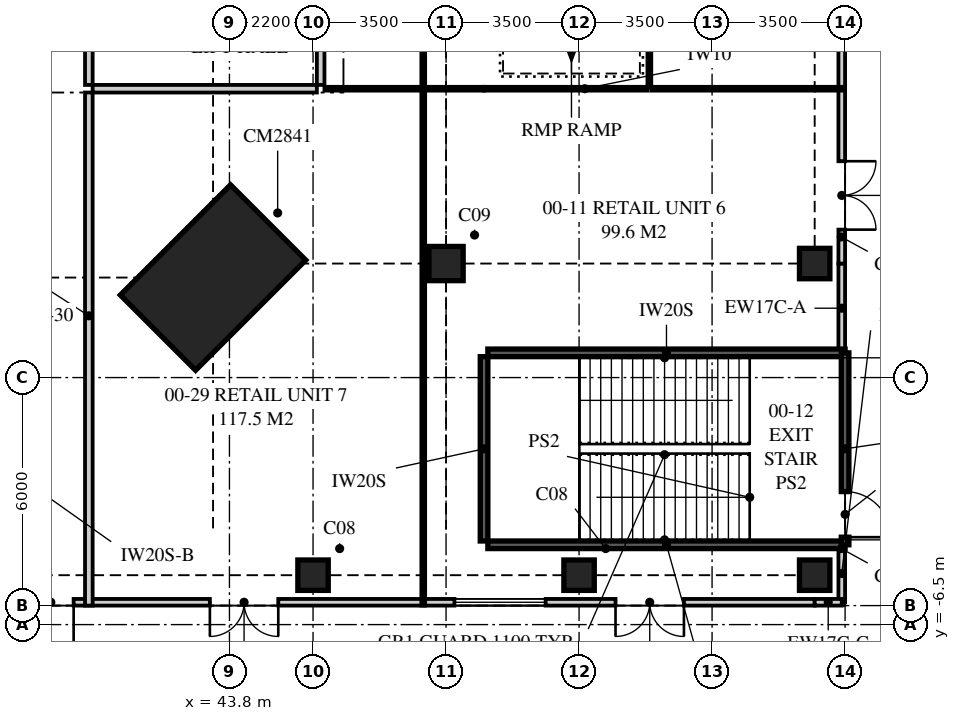
"""IFC4 building model, lengths in metres.
Left out: names, types, materials, properties, quantities, classifications, styles, units other than length and angle.
Written with IfcOpenShell. Run it as: python <this file> out.ifc"""

import sys

from ifc_helpers import new_model, si_unit, direction, frame, frame_2d, origin, origin_2d, place, context, subcontext, project, spatial, polyline, rectangle, outline, extrude, element, fill, save


model = new_model("IFC4")
c1 = context("Model", 3, precision=1e-05, world=origin(), true_north=direction((0.0, 1.0)))
c2 = subcontext(c1, "Body", "Model", "MODEL_VIEW")
j1 = project(units=[si_unit("LENGTHUNIT", "METRE"), si_unit("PLANEANGLEUNIT", "RADIAN")], contexts=[c1])
p1 = place(None, origin())
s1 = spatial("IfcSite", under=j1, at=p1, CompositionType="ELEMENT")
p2 = place(p1, origin())
s2 = spatial("IfcBuilding", under=s1, at=p2, CompositionType="ELEMENT")
p3 = place(p2, origin())
s3 = spatial("IfcBuildingStorey", under=s2, at=p3, CompositionType="ELEMENT", Elevation=0.0)
p4 = place(p3, frame((43.369, 2.631, 0.0), z_axis=(0.0, 0.0, 1.0), x_axis=(-0.707106781187, 0.707106781187, 0.0)))
e1 = element("IfcColumn", 1, at=p4, inside=s3, PredefinedType="COLUMN", context=c2, shape_type="SweptSolid", body=[
    extrude(rectangle(XDim=2.8, YDim=4.1, at=origin_2d()), origin(), (0.0, 0.0, 1.0), 6.0),
])
for number, where, z_axis, x_axis in (
    (2, (46.0, -5.2, 0.0), (0.0, 0.0, 1.0), (1.0, 0.0, 0.0)),
    (3, (53.0, -5.2, 0.0), (0.0, 0.0, 1.0), (1.0, 0.0, 0.0)),
    (4, (59.2, -5.2, 0.0), (0.0, 0.0, 1.0), (1.0, 0.0, 0.0)),
):
    element("IfcColumn", number, at=place(p3, frame(where, z_axis=z_axis, x_axis=x_axis)), inside=s3, PredefinedType="COLUMN", context=c2, shape_type="SweptSolid", body=[
        extrude(rectangle(XDim=0.8, YDim=0.8, at=origin_2d()), origin(), (0.0, 0.0, 1.0), 6.0),
    ])
p5 = place(p3, frame((49.5, 3.0, 0.0), z_axis=(0.0, 0.0, 1.0), x_axis=(1.0, 0.0, 0.0)))
e5 = element("IfcColumn", 5, at=p5, inside=s3, PredefinedType="COLUMN", context=c2, shape_type="SweptSolid", body=[
    extrude(rectangle(XDim=0.9, YDim=0.9, at=origin_2d()), origin(), (0.0, 0.0, 1.0), 6.0),
])
p6 = place(p3, frame((59.2, 3.0, 0.0), z_axis=(0.0, 0.0, 1.0), x_axis=(1.0, 0.0, 0.0)))
e6 = element("IfcColumn", 6, at=p6, inside=s3, PredefinedType="COLUMN", context=c2, shape_type="SweptSolid", body=[
    extrude(rectangle(XDim=0.8, YDim=0.8, at=origin_2d()), origin(), (0.0, 0.0, 1.0), 6.0),
])
p7 = place(p3, frame((-9.2, -5.913, 0.0), z_axis=(0.0, 0.0, 1.0), x_axis=(1.0, 0.0, 0.0)))
e7 = element("IfcWall", 7, at=p7, inside=s3, PredefinedType="SOLIDWALL", context=c2, shape_type="SweptSolid", body=[
    extrude(rectangle(XDim=68.4, YDim=0.175, at=frame_2d((34.2, 0.0))), origin(), (0.0, 0.0, 1.0), 5.12),
])
p8 = place(p7, frame((4.819, 0.0, 0.0)))
e8 = element("IfcOpeningElement", 8, at=p8, cuts=e7, PredefinedType="OPENING", context=c2, shape_type="SweptSolid", body=[
    extrude(rectangle(XDim=1.8, YDim=2.7, at=frame_2d((0.9, 1.35))), frame((0.0, 0.097, 0.0), z_axis=(0.0, -1.0, 0.0), x_axis=(1.0, 0.0, 0.0)), (0.0, 0.0, 1.0), 0.195),
])
p9 = place(p7, frame((0.871, 0.0, 0.3)))
e9 = element("IfcOpeningElement", 9, at=p9, cuts=e7, PredefinedType="OPENING", context=c2, shape_type="SweptSolid", body=[
    extrude(rectangle(XDim=2.4, YDim=3.0, at=frame_2d((1.2, 1.5))), frame((0.0, 0.097, 0.0), z_axis=(0.0, -1.0, 0.0), x_axis=(1.0, 0.0, 0.0)), (0.0, 0.0, 1.0), 0.195),
])
p10 = place(p7, frame((8.334, 0.0, 0.3)))
e10 = element("IfcOpeningElement", 10, at=p10, cuts=e7, PredefinedType="OPENING", context=c2, shape_type="SweptSolid", body=[
    extrude(rectangle(XDim=2.4, YDim=3.0, at=frame_2d((1.2, 1.5))), frame((0.0, 0.097, 0.0), z_axis=(0.0, -1.0, 0.0), x_axis=(1.0, 0.0, 0.0)), (0.0, 0.0, 1.0), 0.195),
])
p11 = place(p7, frame((14.45, 0.0, 0.0)))
e11 = element("IfcOpeningElement", 11, at=p11, cuts=e7, PredefinedType="OPENING", context=c2, shape_type="SweptSolid", body=[
    extrude(rectangle(XDim=2.0, YDim=2.7, at=frame_2d((1.0, 1.35))), frame((0.0, 0.097, 0.0), z_axis=(0.0, -1.0, 0.0), x_axis=(1.0, 0.0, 0.0)), (0.0, 0.0, 1.0), 0.195),
])
p12 = place(p7, frame((22.17, 0.0, 0.0)))
e12 = element("IfcOpeningElement", 12, at=p12, cuts=e7, PredefinedType="OPENING", context=c2, shape_type="SweptSolid", body=[
    extrude(rectangle(XDim=1.8, YDim=2.7, at=frame_2d((0.9, 1.35))), frame((0.0, 0.097, 0.0), z_axis=(0.0, -1.0, 0.0), x_axis=(1.0, 0.0, 0.0)), (0.0, 0.0, 1.0), 0.195),
])
p13 = place(p7, frame((26.75, 0.0, 0.0)))
e13 = element("IfcOpeningElement", 13, at=p13, cuts=e7, PredefinedType="OPENING", context=c2, shape_type="SweptSolid", body=[
    extrude(rectangle(XDim=1.2, YDim=2.1, at=frame_2d((0.6, 1.05))), frame((0.0, 0.097, 0.0), z_axis=(0.0, -1.0, 0.0), x_axis=(1.0, 0.0, 0.0)), (0.0, 0.0, 1.0), 0.195),
])
p14 = place(p7, frame((31.55, 0.0, 0.0)))
e14 = element("IfcOpeningElement", 14, at=p14, cuts=e7, PredefinedType="OPENING", context=c2, shape_type="SweptSolid", body=[
    extrude(rectangle(XDim=1.8, YDim=2.7, at=frame_2d((0.9, 1.35))), frame((0.0, 0.097, 0.0), z_axis=(0.0, -1.0, 0.0), x_axis=(1.0, 0.0, 0.0)), (0.0, 0.0, 1.0), 0.195),
])
p15 = place(p7, frame((40.85, 0.0, 0.0)))
e15 = element("IfcOpeningElement", 15, at=p15, cuts=e7, PredefinedType="OPENING", context=c2, shape_type="SweptSolid", body=[
    extrude(rectangle(XDim=1.8, YDim=2.7, at=frame_2d((0.9, 1.35))), frame((0.0, 0.097, 0.0), z_axis=(0.0, -1.0, 0.0), x_axis=(1.0, 0.0, 0.0)), (0.0, 0.0, 1.0), 0.195),
])
p16 = place(p7, frame((43.445, 0.0, 0.3)))
e16 = element("IfcOpeningElement", 16, at=p16, cuts=e7, PredefinedType="OPENING", context=c2, shape_type="SweptSolid", body=[
    extrude(rectangle(XDim=2.4, YDim=3.0, at=frame_2d((1.2, 1.5))), frame((0.0, 0.097, 0.0), z_axis=(0.0, -1.0, 0.0), x_axis=(1.0, 0.0, 0.0)), (0.0, 0.0, 1.0), 0.195),
])
p17 = place(p7, frame((47.7, 0.0, 0.0)))
e17 = element("IfcOpeningElement", 17, at=p17, cuts=e7, PredefinedType="OPENING", context=c2, shape_type="SweptSolid", body=[
    extrude(rectangle(XDim=1.2, YDim=2.1, at=frame_2d((0.6, 1.05))), frame((0.0, 0.097, 0.0), z_axis=(0.0, -1.0, 0.0), x_axis=(1.0, 0.0, 0.0)), (0.0, 0.0, 1.0), 0.195),
])
p18 = place(p7, frame((52.485, 0.0, 0.0)))
e18 = element("IfcOpeningElement", 18, at=p18, cuts=e7, PredefinedType="OPENING", context=c2, shape_type="SweptSolid", body=[
    extrude(rectangle(XDim=1.8, YDim=2.7, at=frame_2d((0.9, 1.35))), frame((0.0, 0.097, 0.0), z_axis=(0.0, -1.0, 0.0), x_axis=(1.0, 0.0, 0.0)), (0.0, 0.0, 1.0), 0.195),
])
p19 = place(p7, frame((63.159, 0.0, 0.0)))
e19 = element("IfcOpeningElement", 19, at=p19, cuts=e7, PredefinedType="OPENING", context=c2, shape_type="SweptSolid", body=[
    extrude(rectangle(XDim=1.8, YDim=2.7, at=frame_2d((0.9, 1.35))), frame((0.0, 0.097, 0.0), z_axis=(0.0, -1.0, 0.0), x_axis=(1.0, 0.0, 0.0)), (0.0, 0.0, 1.0), 0.195),
])
p20 = place(p7, frame((58.92, 0.0, 0.3)))
e20 = element("IfcOpeningElement", 20, at=p20, cuts=e7, PredefinedType="OPENING", context=c2, shape_type="SweptSolid", body=[
    extrude(rectangle(XDim=2.4, YDim=3.0, at=frame_2d((1.2, 1.5))), frame((0.0, 0.097, 0.0), z_axis=(0.0, -1.0, 0.0), x_axis=(1.0, 0.0, 0.0)), (0.0, 0.0, 1.0), 0.195),
])
p21 = place(p3, frame((59.2, -5.913, 0.0), z_axis=(0.0, 0.0, 1.0), x_axis=(1.0, 0.0, 0.0)))
e21 = element("IfcWall", 21, at=p21, inside=s3, PredefinedType="SOLIDWALL", context=c2, shape_type="SweptSolid", body=[
    extrude(rectangle(XDim=0.713, YDim=0.175, at=frame_2d((0.356, 0.0))), origin(), (0.0, 0.0, 1.0), 5.72),
])
p22 = place(p3, frame((60.0, -4.4, 0.0), z_axis=(0.0, 0.0, 1.0), x_axis=(0.0, 1.0, 0.0)))
e22 = element("IfcWall", 22, at=p22, inside=s3, PredefinedType="SOLIDWALL", context=c2, shape_type="SweptSolid", body=[
    extrude(rectangle(XDim=5.05, YDim=0.2, at=frame_2d((2.525, 0.0))), origin(), (0.0, 0.0, 1.0), 6.0),
])
p23 = place(p22, frame((0.2, 0.0, 0.0)))
e23 = element("IfcOpeningElement", 23, at=p23, cuts=e22, PredefinedType="OPENING", context=c2, shape_type="SweptSolid", body=[
    extrude(rectangle(XDim=1.2, YDim=2.1, at=frame_2d((0.6, 1.05))), frame((0.0, 0.11, 0.0), z_axis=(0.0, -1.0, 0.0), x_axis=(1.0, 0.0, 0.0)), (0.0, 0.0, 1.0), 0.22),
])
p24 = place(p3, frame((59.913, -5.913, 0.0), z_axis=(0.0, 0.0, 1.0), x_axis=(0.0, 1.0, 0.0)))
e24 = element("IfcWall", 24, at=p24, inside=s3, PredefinedType="SOLIDWALL", context=c2, shape_type="SweptSolid", body=[
    extrude(rectangle(XDim=1.513, YDim=0.175, at=frame_2d((0.756, 0.0))), origin(), (0.0, 0.0, 1.0), 5.72),
])
p25 = place(p3, frame((59.913, 0.65, 0.0), z_axis=(0.0, 0.0, 1.0), x_axis=(0.0, 1.0, 0.0)))
e25 = element("IfcWall", 25, at=p25, inside=s3, PredefinedType="SOLIDWALL", context=c2, shape_type="SweptSolid", body=[
    extrude(rectangle(XDim=2.35, YDim=0.175, at=frame_2d((1.175, 0.0))), origin(), (0.0, 0.0, 1.0), 5.72),
])
p26 = place(p3, frame((59.913, 3.0, 0.0), z_axis=(0.0, 0.0, 1.0), x_axis=(0.0, 1.0, 0.0)))
e26 = element("IfcWall", 26, at=p26, inside=s3, PredefinedType="SOLIDWALL", context=c2, shape_type="SweptSolid", body=[
    extrude(rectangle(XDim=42.2, YDim=0.175, at=frame_2d((21.1, 0.0))), origin(), (0.0, 0.0, 1.0), 5.12),
])
p27 = place(p26, frame((0.893, 0.0, 0.0)))
e27 = element("IfcOpeningElement", 27, at=p27, cuts=e26, PredefinedType="OPENING", context=c2, shape_type="SweptSolid", body=[
    extrude(rectangle(XDim=1.8, YDim=2.7, at=frame_2d((0.9, 1.35))), frame((0.0, 0.097, 0.0), z_axis=(0.0, -1.0, 0.0), x_axis=(1.0, 0.0, 0.0)), (0.0, 0.0, 1.0), 0.195),
])
p28 = place(p26, frame((14.8, 0.0, 0.0)))
e28 = element("IfcOpeningElement", 28, at=p28, cuts=e26, PredefinedType="OPENING", context=c2, shape_type="SweptSolid", body=[
    extrude(rectangle(XDim=1.0, YDim=2.2, at=frame_2d((0.5, 1.1))), frame((0.0, 0.097, 0.0), z_axis=(0.0, -1.0, 0.0), x_axis=(1.0, 0.0, 0.0)), (0.0, 0.0, 1.0), 0.195),
])
p29 = place(p3, frame((50.5, -4.3, 0.0), z_axis=(0.0, 0.0, 1.0), x_axis=(0.0, 1.0, 0.0)))
e29 = element("IfcWall", 29, at=p29, inside=s3, PredefinedType="SOLIDWALL", context=c2, shape_type="SweptSolid", body=[
    extrude(rectangle(XDim=4.85, YDim=0.2, at=frame_2d((2.425, 0.0))), origin(), (0.0, 0.0, 1.0), 6.0),
])
p30 = place(p3, frame((48.95, 7.6, 0.0), z_axis=(0.0, 0.0, 1.0), x_axis=(1.0, 0.0, 0.0)))
e30 = element("IfcWall", 30, at=p30, inside=s3, PredefinedType="PARTITIONING", context=c2, shape_type="SweptSolid", body=[
    extrude(outline(polyline([(0.0, 0.0), (1.55, 0.0), (1.55, 5.72), (1.55, 5.12), (0.0, 5.12), (0.0, 5.72), (0.0, 0.0)])), frame((0.0, 0.05, 0.0), z_axis=(0.0, -1.0, 0.0), x_axis=(1.0, 0.0, 0.0)), (0.0, 0.0, 1.0), 0.1),
])
p31 = place(p3, frame((48.9, -6.0, 0.0), z_axis=(0.0, 0.0, 1.0), x_axis=(0.0, 1.0, 0.0)))
e31 = element("IfcWall", 31, at=p31, inside=s3, PredefinedType="PARTITIONING", context=c2, shape_type="SweptSolid", body=[
    extrude(outline(polyline([(0.0, 0.0), (13.55, 0.0), (13.55, 5.72), (13.55, 5.12), (10.26, 5.12), (9.06, 5.12), (2.06, 5.12), (0.0, 5.12), (0.0, 5.72), (0.0, 0.0)])), frame((0.0, 0.05, 0.0), z_axis=(0.0, -1.0, 0.0), x_axis=(1.0, 0.0, 0.0)), (0.0, 0.0, 1.0), 0.1),
])
for number, where, z_axis, x_axis in (
    (32, (50.6, -4.4, 0.0), (0.0, 0.0, 1.0), (1.0, 0.0, 0.0)),
    (33, (50.6, 0.65, 0.0), (0.0, 0.0, 1.0), (1.0, 0.0, 0.0)),
):
    element("IfcWall", number, at=place(p3, frame(where, z_axis=z_axis, x_axis=x_axis)), inside=s3, PredefinedType="SOLIDWALL", context=c2, shape_type="SweptSolid", body=[
        extrude(rectangle(XDim=9.4, YDim=0.2, at=frame_2d((4.7, 0.0))), origin(), (0.0, 0.0, 1.0), 6.0),
    ])
p32 = place(p3, frame((54.9, 7.6, 0.0), z_axis=(0.0, 0.0, 1.0), x_axis=(1.0, 0.0, 0.0)))
e34 = element("IfcWall", 34, at=p32, inside=s3, PredefinedType="PARTITIONING", context=c2, shape_type="SweptSolid", body=[
    extrude(outline(polyline([(0.0, 0.0), (5.1, 0.0), (5.1, 5.72), (5.1, 5.12), (3.04, 5.12), (3.04, 5.72), (0.0, 5.72), (0.0, 0.0)])), frame((0.0, 0.05, 0.0), z_axis=(0.0, -1.0, 0.0), x_axis=(1.0, 0.0, 0.0)), (0.0, 0.0, 1.0), 0.1),
])
p33 = place(p3, frame((50.5, 7.6, 0.0), z_axis=(0.0, 0.0, 1.0), x_axis=(1.0, 0.0, 0.0)))
e35 = element("IfcWall", 35, at=p33, inside=s3, PredefinedType="PARTITIONING", context=c2, shape_type="SweptSolid", body=[
    extrude(outline(polyline([(0.0, 0.0), (4.3, 0.0), (4.3, 5.72), (0.26, 5.72), (0.26, 5.12), (0.0, 5.12), (0.0, 5.72), (0.0, 0.0)])), frame((0.0, 0.05, 0.0), z_axis=(0.0, -1.0, 0.0), x_axis=(1.0, 0.0, 0.0)), (0.0, 0.0, 1.0), 0.1),
])
p34 = place(p3, frame((46.2, 7.7, 0.0), z_axis=(0.0, 0.0, 1.0), x_axis=(0.0, 1.0, 0.0)))
e36 = element("IfcWall", 36, at=p34, inside=s3, PredefinedType="PARTITIONING", context=c2, shape_type="SweptSolid", body=[
    extrude(rectangle(XDim=1.55, YDim=0.2, at=frame_2d((0.775, 0.0))), origin(), (0.0, 0.0, 1.0), 5.72),
])
p35 = place(p3, frame((40.2, 7.6, 0.0), z_axis=(0.0, 0.0, 1.0), x_axis=(1.0, 0.0, 0.0)))
e37 = element("IfcWall", 37, at=p35, inside=s3, PredefinedType="PARTITIONING", context=c2, shape_type="SweptSolid", body=[
    extrude(outline(polyline([(0.0, 0.0), (5.9, 0.0), (5.9, 5.72), (4.479, 5.72), (4.479, 4.92), (1.859, 4.92), (1.859, 5.72), (0.0, 5.72), (0.0, 0.0)])), frame((0.0, 0.1, 0.0), z_axis=(0.0, -1.0, 0.0), x_axis=(1.0, 0.0, 0.0)), (0.0, 0.0, 1.0), 0.2),
])
p36 = place(p3, frame((40.1, 7.7, 0.0), z_axis=(0.0, 0.0, 1.0), x_axis=(0.0, 1.0, 0.0)))
e38 = element("IfcWall", 38, at=p36, inside=s3, PredefinedType="SOLIDWALL", context=c2, shape_type="SweptSolid", body=[
    extrude(rectangle(XDim=1.55, YDim=0.2, at=frame_2d((0.775, 0.0))), origin(), (0.0, 0.0, 1.0), 5.72),
])
p37 = place(p3, frame((48.9, 7.65, 0.0), z_axis=(0.0, 0.0, 1.0), x_axis=(0.0, 1.0, 0.0)))
e39 = element("IfcWall", 39, at=p37, inside=s3, PredefinedType="PARTITIONING", context=c2, shape_type="SweptSolid", body=[
    extrude(outline(polyline([(0.0, 0.0), (10.8, 0.0), (10.8, 5.72), (10.8, 5.12), (5.01, 5.12), (3.81, 5.12), (0.0, 5.12), (0.0, 5.72), (0.0, 0.0)])), frame((0.0, 0.05, 0.0), z_axis=(0.0, -1.0, 0.0), x_axis=(1.0, 0.0, 0.0)), (0.0, 0.0, 1.0), 0.1),
])
p38 = place(p3, frame((46.3, 7.6, 0.0), z_axis=(0.0, 0.0, 1.0), x_axis=(1.0, 0.0, 0.0)))
e40 = element("IfcWall", 40, at=p38, inside=s3, PredefinedType="PARTITIONING", context=c2, shape_type="SweptSolid", body=[
    extrude(outline(polyline([(0.0, 0.0), (2.55, 0.0), (2.55, 5.72), (2.55, 5.12), (1.94, 5.12), (1.94, 5.72), (0.0, 5.72), (0.0, 0.0)])), frame((0.0, 0.05, 0.0), z_axis=(0.0, -1.0, 0.0), x_axis=(1.0, 0.0, 0.0)), (0.0, 0.0, 1.0), 0.1),
])
p39 = place(p3, frame((54.85, 7.65, 0.0), z_axis=(0.0, 0.0, 1.0), x_axis=(0.0, 1.0, 0.0)))
e41 = element("IfcWall", 41, at=p39, inside=s3, PredefinedType="PARTITIONING", context=c2, shape_type="SweptSolid", body=[
    extrude(outline(polyline([(0.0, 0.0), (21.2, 0.0), (21.2, 5.72), (21.2, 5.12), (19.29, 5.12), (19.29, 5.72), (13.41, 5.72), (13.41, 5.12), (10.89, 5.12), (10.89, 5.72), (5.01, 5.72), (5.01, 5.12), (2.49, 5.12), (2.49, 5.72), (0.0, 5.72), (0.0, 0.0)])), frame((0.0, 0.05, 0.0), z_axis=(0.0, -1.0, 0.0), x_axis=(1.0, 0.0, 0.0)), (0.0, 0.0, 1.0), 0.1),
])
p40 = place(p3, frame((40.1, -6.0, 0.0), z_axis=(0.0, 0.0, 1.0), x_axis=(0.0, 1.0, 0.0)))
e42 = element("IfcWall", 42, at=p40, inside=s3, PredefinedType="SOLIDWALL", context=c2, shape_type="SweptSolid", body=[
    extrude(outline(polyline([(0.0, 0.0), (13.5, 0.0), (13.5, 5.72), (9.941, 5.72), (9.941, 5.12), (7.321, 5.12), (7.321, 5.72), (2.11, 5.72), (2.11, 5.12), (0.0, 5.12), (0.0, 5.72), (0.0, 0.0)])), frame((0.0, 0.1, 0.0), z_axis=(0.0, -1.0, 0.0), x_axis=(1.0, 0.0, 0.0)), (0.0, 0.0, 1.0), 0.2),
])
p41 = place(p17, frame((1.2, 0.0, 0.0), z_axis=(0.0, 0.0, 1.0), x_axis=(-1.0, 0.0, 0.0)))
e43 = element("IfcDoor", 43, at=p41, inside=s3, OperationType="SINGLE_SWING_LEFT", PredefinedType="DOOR", context=c2, shape_type="SweptSolid", body=[
    extrude(rectangle(XDim=1.2, YDim=2.1, at=frame_2d((0.6, 1.05))), frame((0.0, 0.025, 0.0), z_axis=(0.0, -1.0, 0.0), x_axis=(1.0, 0.0, 0.0)), (0.0, 0.0, 1.0), 0.05),
])
fill(e17, e43)
p42 = place(p18, frame((1.8, 0.0, 0.0), z_axis=(0.0, 0.0, 1.0), x_axis=(-1.0, 0.0, 0.0)))
e44 = element("IfcDoor", 44, at=p42, inside=s3, OperationType="DOUBLE_DOOR_SINGLE_SWING", PredefinedType="DOOR", context=c2, shape_type="SweptSolid", body=[
    extrude(rectangle(XDim=1.8, YDim=2.7, at=frame_2d((0.9, 1.35))), frame((0.0, 0.025, 0.0), z_axis=(0.0, -1.0, 0.0), x_axis=(1.0, 0.0, 0.0)), (0.0, 0.0, 1.0), 0.05),
])
fill(e18, e44)
p43 = place(p19, frame((1.8, 0.0, 0.0), z_axis=(0.0, 0.0, 1.0), x_axis=(-1.0, 0.0, 0.0)))
e45 = element("IfcDoor", 45, at=p43, inside=s3, OperationType="DOUBLE_DOOR_SINGLE_SWING", PredefinedType="DOOR", context=c2, shape_type="SweptSolid", body=[
    extrude(rectangle(XDim=1.8, YDim=2.7, at=frame_2d((0.9, 1.35))), frame((0.0, 0.025, 0.0), z_axis=(0.0, -1.0, 0.0), x_axis=(1.0, 0.0, 0.0)), (0.0, 0.0, 1.0), 0.05),
])
fill(e19, e45)
p44 = place(p20, origin())
e46 = element("IfcWindow", 46, at=p44, inside=s3, PartitioningType="SINGLE_PANEL", PredefinedType="WINDOW", context=c2, shape_type="SweptSolid", body=[
    extrude(rectangle(XDim=2.4, YDim=3.0, at=frame_2d((1.2, 1.5))), frame((0.0, 0.03, 0.0), z_axis=(0.0, -1.0, 0.0), x_axis=(1.0, 0.0, 0.0)), (0.0, 0.0, 1.0), 0.06),
])
fill(e20, e46)
p45 = place(p23, frame((1.2, 0.0, 0.0), z_axis=(0.0, 0.0, 1.0), x_axis=(-1.0, 0.0, 0.0)))
e47 = element("IfcDoor", 47, at=p45, inside=s3, OperationType="SINGLE_SWING_RIGHT", PredefinedType="DOOR", context=c2, shape_type="SweptSolid", body=[
    extrude(rectangle(XDim=1.2, YDim=2.1, at=frame_2d((0.6, 1.05))), frame((0.0, 0.025, 0.0), z_axis=(0.0, -1.0, 0.0), x_axis=(1.0, 0.0, 0.0)), (0.0, 0.0, 1.0), 0.05),
])
fill(e23, e47)
p46 = place(p27, frame((1.8, 0.0, 0.0), z_axis=(0.0, 0.0, 1.0), x_axis=(-1.0, 0.0, 0.0)))
e48 = element("IfcDoor", 48, at=p46, inside=s3, OperationType="DOUBLE_DOOR_SINGLE_SWING", PredefinedType="DOOR", context=c2, shape_type="SweptSolid", body=[
    extrude(rectangle(XDim=1.8, YDim=2.7, at=frame_2d((0.9, 1.35))), frame((0.0, 0.025, 0.0), z_axis=(0.0, -1.0, 0.0), x_axis=(1.0, 0.0, 0.0)), (0.0, 0.0, 1.0), 0.05),
])
fill(e27, e48)
save(model, sys.argv[1])
